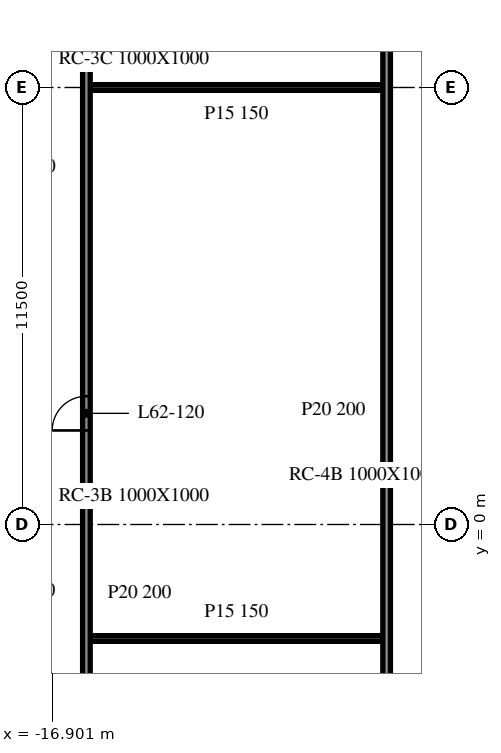
"""IFC4 building model, lengths in metres.
Left out: names, types, materials, properties, quantities, classifications, styles, units other than length and angle.
Written with IfcOpenShell. Run it as: python <this file> out.ifc"""

import sys

from ifc_helpers import new_model, si_unit, direction, frame, frame_2d, origin, place, context, subcontext, project, spatial, rectangle, extrude, element, fill, save


model = new_model("IFC4")
c1 = context("Model", 3, precision=1e-05, world=origin(), true_north=direction((0.0, 1.0)))
c2 = subcontext(c1, "Body", "Model", "MODEL_VIEW")
j1 = project(units=[si_unit("LENGTHUNIT", "METRE"), si_unit("PLANEANGLEUNIT", "RADIAN")], contexts=[c1])
p1 = place(None, origin())
s1 = spatial("IfcSite", under=j1, at=p1, CompositionType="ELEMENT")
p2 = place(p1, origin())
s2 = spatial("IfcBuilding", under=s1, at=p2, CompositionType="ELEMENT")
p3 = place(p2, frame((0.0, 0.0, 255.2)))
s3 = spatial("IfcBuildingStorey", under=s2, at=p3, CompositionType="ELEMENT", Elevation=255.2)
for number, where, z_axis, x_axis in (
    (1, (-15.9, -3.0, 0.0), (0.0, 0.0, 1.0), (1.0, 0.0, 0.0)),
    (2, (-15.9, 11.5, 0.0), (0.0, 0.0, 1.0), (1.0, 0.0, 0.0)),
):
    element("IfcWall", number, at=place(p3, frame(where, z_axis=z_axis, x_axis=x_axis)), inside=s3, PredefinedType="PARTITIONING", context=c2, shape_type="SweptSolid", body=[
        extrude(rectangle(XDim=7.7, YDim=0.15, at=frame_2d((3.85, 0.0))), origin(), (0.0, 0.0, 1.0), 3.4),
    ])
p4 = place(p3, frame((-16.0, -9.025, 0.0), z_axis=(0.0, 0.0, 1.0), x_axis=(0.0, 1.0, 0.0)))
e3 = element("IfcWall", 3, at=p4, inside=s3, PredefinedType="PARTITIONING", context=c2, shape_type="SweptSolid", body=[
    extrude(rectangle(XDim=24.05, YDim=0.2, at=frame_2d((12.025, 0.0))), origin(), (0.0, 0.0, 1.0), 3.4),
])
p5 = place(p4, frame((11.5, 0.0, 0.0)))
e4 = element("IfcOpeningElement", 4, at=p5, cuts=e3, PredefinedType="OPENING", context=c2, shape_type="SweptSolid", body=[
    extrude(rectangle(XDim=0.9, YDim=2.1, at=frame_2d((0.45, 1.05))), frame((0.0, 0.11, 0.0), z_axis=(0.0, -1.0, 0.0), x_axis=(1.0, 0.0, 0.0)), (0.0, 0.0, 1.0), 0.22),
])
p6 = place(p3, frame((-8.1, -9.025, 0.0), z_axis=(0.0, 0.0, 1.0), x_axis=(0.0, 1.0, 0.0)))
e5 = element("IfcWall", 5, at=p6, inside=s3, PredefinedType="PARTITIONING", context=c2, shape_type="SweptSolid", body=[
    extrude(rectangle(XDim=24.05, YDim=0.2, at=frame_2d((12.025, 0.0))), origin(), (0.0, 0.0, 1.0), 3.4),
])
p7 = place(p5, origin())
e6 = element("IfcDoor", 6, at=p7, inside=s3, OperationType="SINGLE_SWING_RIGHT", PredefinedType="DOOR", context=c2, shape_type="SweptSolid", body=[
    extrude(rectangle(XDim=0.9, YDim=2.1, at=frame_2d((0.45, 1.05))), frame((0.0, 0.025, 0.0), z_axis=(0.0, -1.0, 0.0), x_axis=(1.0, 0.0, 0.0)), (0.0, 0.0, 1.0), 0.05),
])
fill(e4, e6)
save(model, sys.argv[1])
